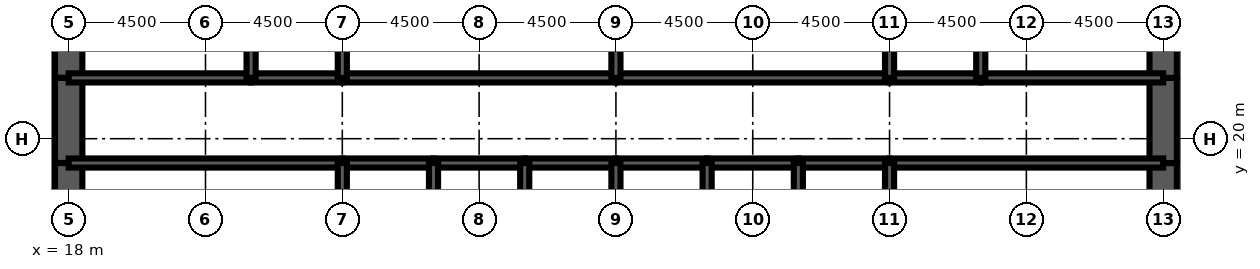
"""IFC4 building model, lengths in metres.
Left out: names, types, materials, properties, quantities, classifications, styles, units other than length and angle.
Written with IfcOpenShell. Run it as: python <this file> out.ifc"""

import sys

from ifc_helpers import new_model, si_unit, direction, frame, frame_2d, origin, place, context, subcontext, project, spatial, rectangle, extrude, element, fill, save


model = new_model("IFC4")
c1 = context("Model", 3, precision=1e-05, world=origin(), true_north=direction((0.0, 1.0)))
c2 = subcontext(c1, "Body", "Model", "MODEL_VIEW")
j1 = project(units=[si_unit("LENGTHUNIT", "METRE"), si_unit("PLANEANGLEUNIT", "RADIAN")], contexts=[c1])
p1 = place(None, origin())
s1 = spatial("IfcSite", under=j1, at=p1, CompositionType="ELEMENT")
p2 = place(p1, origin())
s2 = spatial("IfcBuilding", under=s1, at=p2, CompositionType="ELEMENT")
p3 = place(p2, frame((0.0, 0.0, 81.5)))
s3 = spatial("IfcBuildingStorey", under=s2, at=p3, CompositionType="ELEMENT", Elevation=81.5)
p4 = place(p3, frame((18.0, 26.0, 0.0), z_axis=(0.0, 0.0, 1.0), x_axis=(0.0, -1.0, 0.0)))
e1 = element("IfcWall", 1, at=p4, inside=s3, PredefinedType="SHEAR", context=c2, shape_type="SweptSolid", body=[
    extrude(rectangle(XDim=4.0, YDim=0.9, at=frame_2d((2.0, 0.0))), origin(), (0.0, 0.0, 1.0), 4.5),
])
p5 = place(p3, frame((18.0, 22.0, 0.0), z_axis=(0.0, 0.0, 1.0), x_axis=(0.0, -1.0, 0.0)))
e2 = element("IfcWall", 2, at=p5, inside=s3, PredefinedType="SHEAR", context=c2, shape_type="SweptSolid", body=[
    extrude(rectangle(XDim=2.8, YDim=0.9, at=frame_2d((1.4, 0.0))), origin(), (0.0, 0.0, 1.0), 4.5),
])
p6 = place(p5, frame((0.6, 0.0, 0.0)))
e3 = element("IfcOpeningElement", 3, at=p6, cuts=e2, PredefinedType="OPENING", context=c2, shape_type="SweptSolid", body=[
    extrude(rectangle(XDim=1.8, YDim=2.1, at=frame_2d((0.9, 1.05))), frame((0.0, 0.46, 0.0), z_axis=(0.0, -1.0, 0.0), x_axis=(1.0, 0.0, 0.0)), (0.0, 0.0, 1.0), 0.92),
])
for number, where, z_axis, x_axis in (
    (4, (18.0, 19.2, 0.0), (0.0, 0.0, 1.0), (0.0, -1.0, 0.0)),
    (5, (54.0, 16.0, 0.0), (0.0, 0.0, 1.0), (0.0, 1.0, 0.0)),
):
    element("IfcWall", number, at=place(p3, frame(where, z_axis=z_axis, x_axis=x_axis)), inside=s3, PredefinedType="SHEAR", context=c2, shape_type="SweptSolid", body=[
        extrude(rectangle(XDim=3.2, YDim=0.9, at=frame_2d((1.6, 0.0))), origin(), (0.0, 0.0, 1.0), 4.5),
    ])
p7 = place(p3, frame((54.0, 19.2, 0.0), z_axis=(0.0, 0.0, 1.0), x_axis=(0.0, 1.0, 0.0)))
e6 = element("IfcWall", 6, at=p7, inside=s3, PredefinedType="SHEAR", context=c2, shape_type="SweptSolid", body=[
    extrude(rectangle(XDim=2.8, YDim=0.9, at=frame_2d((1.4, 0.0))), origin(), (0.0, 0.0, 1.0), 4.5),
])
p8 = place(p7, frame((0.4, 0.0, 0.0)))
e7 = element("IfcOpeningElement", 7, at=p8, cuts=e6, PredefinedType="OPENING", context=c2, shape_type="SweptSolid", body=[
    extrude(rectangle(XDim=1.8, YDim=2.1, at=frame_2d((0.9, 1.05))), frame((0.0, 0.46, 0.0), z_axis=(0.0, -1.0, 0.0), x_axis=(1.0, 0.0, 0.0)), (0.0, 0.0, 1.0), 0.92),
])
p9 = place(p3, frame((54.0, 22.0, 0.0), z_axis=(0.0, 0.0, 1.0), x_axis=(0.0, 1.0, 0.0)))
e8 = element("IfcWall", 8, at=p9, inside=s3, PredefinedType="SHEAR", context=c2, shape_type="SweptSolid", body=[
    extrude(rectangle(XDim=4.0, YDim=0.9, at=frame_2d((2.0, 0.0))), origin(), (0.0, 0.0, 1.0), 4.5),
])
p10 = place(p3, frame((18.0, 19.2, 0.0), z_axis=(0.0, 0.0, 1.0), x_axis=(1.0, 0.0, 0.0)))
e9 = element("IfcWall", 9, at=p10, inside=s3, PredefinedType="SOLIDWALL", context=c2, shape_type="SweptSolid", body=[
    extrude(rectangle(XDim=9.0, YDim=0.3, at=frame_2d((4.5, 0.0))), origin(), (0.0, 0.0, 1.0), 4.5),
])
p11 = place(p10, frame((0.65, 0.0, 0.0)))
e10 = element("IfcOpeningElement", 10, at=p11, cuts=e9, PredefinedType="OPENING", context=c2, shape_type="SweptSolid", body=[
    extrude(rectangle(XDim=1.0, YDim=2.1, at=frame_2d((0.5, 1.05))), frame((0.0, 0.16, 0.0), z_axis=(0.0, -1.0, 0.0), x_axis=(1.0, 0.0, 0.0)), (0.0, 0.0, 1.0), 0.32),
])
p12 = place(p3, frame((27.0, 19.2, 0.0), z_axis=(0.0, 0.0, 1.0), x_axis=(1.0, 0.0, 0.0)))
e11 = element("IfcWall", 11, at=p12, inside=s3, PredefinedType="SOLIDWALL", context=c2, shape_type="SweptSolid", body=[
    extrude(rectangle(XDim=3.0, YDim=0.3, at=frame_2d((1.5, 0.0))), origin(), (0.0, 0.0, 1.0), 4.5),
])
p13 = place(p12, frame((0.95, 0.0, 0.0)))
e12 = element("IfcOpeningElement", 12, at=p13, cuts=e11, PredefinedType="OPENING", context=c2, shape_type="SweptSolid", body=[
    extrude(rectangle(XDim=1.1, YDim=2.2, at=frame_2d((0.55, 1.1))), frame((0.0, 0.16, 0.0), z_axis=(0.0, -1.0, 0.0), x_axis=(1.0, 0.0, 0.0)), (0.0, 0.0, 1.0), 0.32),
])
p14 = place(p3, frame((30.0, 19.2, 0.0), z_axis=(0.0, 0.0, 1.0), x_axis=(1.0, 0.0, 0.0)))
e13 = element("IfcWall", 13, at=p14, inside=s3, PredefinedType="SOLIDWALL", context=c2, shape_type="SweptSolid", body=[
    extrude(rectangle(XDim=3.0, YDim=0.3, at=frame_2d((1.5, 0.0))), origin(), (0.0, 0.0, 1.0), 4.5),
])
p15 = place(p14, frame((0.95, 0.0, 0.0)))
e14 = element("IfcOpeningElement", 14, at=p15, cuts=e13, PredefinedType="OPENING", context=c2, shape_type="SweptSolid", body=[
    extrude(rectangle(XDim=1.1, YDim=2.2, at=frame_2d((0.55, 1.1))), frame((0.0, 0.16, 0.0), z_axis=(0.0, -1.0, 0.0), x_axis=(1.0, 0.0, 0.0)), (0.0, 0.0, 1.0), 0.32),
])
p16 = place(p3, frame((33.0, 19.2, 0.0), z_axis=(0.0, 0.0, 1.0), x_axis=(1.0, 0.0, 0.0)))
e15 = element("IfcWall", 15, at=p16, inside=s3, PredefinedType="SOLIDWALL", context=c2, shape_type="SweptSolid", body=[
    extrude(rectangle(XDim=3.0, YDim=0.3, at=frame_2d((1.5, 0.0))), origin(), (0.0, 0.0, 1.0), 4.5),
])
p17 = place(p16, frame((0.95, 0.0, 0.0)))
e16 = element("IfcOpeningElement", 16, at=p17, cuts=e15, PredefinedType="OPENING", context=c2, shape_type="SweptSolid", body=[
    extrude(rectangle(XDim=1.1, YDim=2.2, at=frame_2d((0.55, 1.1))), frame((0.0, 0.16, 0.0), z_axis=(0.0, -1.0, 0.0), x_axis=(1.0, 0.0, 0.0)), (0.0, 0.0, 1.0), 0.32),
])
p18 = place(p3, frame((36.0, 19.2, 0.0), z_axis=(0.0, 0.0, 1.0), x_axis=(1.0, 0.0, 0.0)))
e17 = element("IfcWall", 17, at=p18, inside=s3, PredefinedType="SOLIDWALL", context=c2, shape_type="SweptSolid", body=[
    extrude(rectangle(XDim=3.0, YDim=0.3, at=frame_2d((1.5, 0.0))), origin(), (0.0, 0.0, 1.0), 4.5),
])
p19 = place(p18, frame((0.95, 0.0, 0.0)))
e18 = element("IfcOpeningElement", 18, at=p19, cuts=e17, PredefinedType="OPENING", context=c2, shape_type="SweptSolid", body=[
    extrude(rectangle(XDim=1.1, YDim=2.2, at=frame_2d((0.55, 1.1))), frame((0.0, 0.16, 0.0), z_axis=(0.0, -1.0, 0.0), x_axis=(1.0, 0.0, 0.0)), (0.0, 0.0, 1.0), 0.32),
])
for number, where, z_axis, x_axis in (
    (19, (39.0, 19.2, 0.0), (0.0, 0.0, 1.0), (1.0, 0.0, 0.0)),
    (20, (42.0, 19.2, 0.0), (0.0, 0.0, 1.0), (1.0, 0.0, 0.0)),
):
    element("IfcWall", number, at=place(p3, frame(where, z_axis=z_axis, x_axis=x_axis)), inside=s3, PredefinedType="SOLIDWALL", context=c2, shape_type="SweptSolid", body=[
        extrude(rectangle(XDim=3.0, YDim=0.3, at=frame_2d((1.5, 0.0))), origin(), (0.0, 0.0, 1.0), 4.5),
    ])
p20 = place(p3, frame((45.0, 19.2, 0.0), z_axis=(0.0, 0.0, 1.0), x_axis=(1.0, 0.0, 0.0)))
e21 = element("IfcWall", 21, at=p20, inside=s3, PredefinedType="SOLIDWALL", context=c2, shape_type="SweptSolid", body=[
    extrude(rectangle(XDim=9.0, YDim=0.3, at=frame_2d((4.5, 0.0))), origin(), (0.0, 0.0, 1.0), 4.5),
])
p21 = place(p20, frame((7.35, 0.0, 0.0)))
e22 = element("IfcOpeningElement", 22, at=p21, cuts=e21, PredefinedType="OPENING", context=c2, shape_type="SweptSolid", body=[
    extrude(rectangle(XDim=1.0, YDim=2.1, at=frame_2d((0.5, 1.05))), frame((0.0, 0.16, 0.0), z_axis=(0.0, -1.0, 0.0), x_axis=(1.0, 0.0, 0.0)), (0.0, 0.0, 1.0), 0.32),
])
p22 = place(p3, frame((18.0, 22.0, 0.0), z_axis=(0.0, 0.0, 1.0), x_axis=(1.0, 0.0, 0.0)))
e23 = element("IfcWall", 23, at=p22, inside=s3, PredefinedType="SOLIDWALL", context=c2, shape_type="SweptSolid", body=[
    extrude(rectangle(XDim=6.0, YDim=0.3, at=frame_2d((3.0, 0.0))), origin(), (0.0, 0.0, 1.0), 4.5),
])
p23 = place(p22, frame((4.4, 0.0, 0.0)))
e24 = element("IfcOpeningElement", 24, at=p23, cuts=e23, PredefinedType="OPENING", context=c2, shape_type="SweptSolid", body=[
    extrude(rectangle(XDim=1.0, YDim=2.1, at=frame_2d((0.5, 1.05))), frame((0.0, 0.16, 0.0), z_axis=(0.0, -1.0, 0.0), x_axis=(1.0, 0.0, 0.0)), (0.0, 0.0, 1.0), 0.32),
])
p24 = place(p22, frame((0.7, 0.0, 0.0)))
e25 = element("IfcOpeningElement", 25, at=p24, cuts=e23, PredefinedType="OPENING", context=c2, shape_type="SweptSolid", body=[
    extrude(rectangle(XDim=1.0, YDim=2.1, at=frame_2d((0.5, 1.05))), frame((0.0, 0.16, 0.0), z_axis=(0.0, -1.0, 0.0), x_axis=(1.0, 0.0, 0.0)), (0.0, 0.0, 1.0), 0.32),
])
p25 = place(p3, frame((24.0, 22.0, 0.0), z_axis=(0.0, 0.0, 1.0), x_axis=(1.0, 0.0, 0.0)))
e26 = element("IfcWall", 26, at=p25, inside=s3, PredefinedType="SOLIDWALL", context=c2, shape_type="SweptSolid", body=[
    extrude(rectangle(XDim=3.0, YDim=0.3, at=frame_2d((1.5, 0.0))), origin(), (0.0, 0.0, 1.0), 4.5),
])
p26 = place(p25, frame((1.0, 0.0, 0.0)))
e27 = element("IfcOpeningElement", 27, at=p26, cuts=e26, PredefinedType="OPENING", context=c2, shape_type="SweptSolid", body=[
    extrude(rectangle(XDim=1.0, YDim=2.1, at=frame_2d((0.5, 1.05))), frame((0.0, 0.16, 0.0), z_axis=(0.0, -1.0, 0.0), x_axis=(1.0, 0.0, 0.0)), (0.0, 0.0, 1.0), 0.32),
])
p27 = place(p3, frame((27.0, 22.0, 0.0), z_axis=(0.0, 0.0, 1.0), x_axis=(1.0, 0.0, 0.0)))
e28 = element("IfcWall", 28, at=p27, inside=s3, PredefinedType="SOLIDWALL", context=c2, shape_type="SweptSolid", body=[
    extrude(rectangle(XDim=9.0, YDim=0.3, at=frame_2d((4.5, 0.0))), origin(), (0.0, 0.0, 1.0), 4.5),
])
p28 = place(p27, frame((4.0, 0.0, 0.0)))
e29 = element("IfcOpeningElement", 29, at=p28, cuts=e28, PredefinedType="OPENING", context=c2, shape_type="SweptSolid", body=[
    extrude(rectangle(XDim=1.0, YDim=2.1, at=frame_2d((0.5, 1.05))), frame((0.0, 0.16, 0.0), z_axis=(0.0, -1.0, 0.0), x_axis=(1.0, 0.0, 0.0)), (0.0, 0.0, 1.0), 0.32),
])
p29 = place(p3, frame((36.0, 22.0, 0.0), z_axis=(0.0, 0.0, 1.0), x_axis=(1.0, 0.0, 0.0)))
e30 = element("IfcWall", 30, at=p29, inside=s3, PredefinedType="SOLIDWALL", context=c2, shape_type="SweptSolid", body=[
    extrude(rectangle(XDim=9.0, YDim=0.3, at=frame_2d((4.5, 0.0))), origin(), (0.0, 0.0, 1.0), 4.5),
])
p30 = place(p29, frame((4.0, 0.0, 0.0)))
e31 = element("IfcOpeningElement", 31, at=p30, cuts=e30, PredefinedType="OPENING", context=c2, shape_type="SweptSolid", body=[
    extrude(rectangle(XDim=1.0, YDim=2.1, at=frame_2d((0.5, 1.05))), frame((0.0, 0.16, 0.0), z_axis=(0.0, -1.0, 0.0), x_axis=(1.0, 0.0, 0.0)), (0.0, 0.0, 1.0), 0.32),
])
p31 = place(p3, frame((45.0, 22.0, 0.0), z_axis=(0.0, 0.0, 1.0), x_axis=(1.0, 0.0, 0.0)))
e32 = element("IfcWall", 32, at=p31, inside=s3, PredefinedType="SOLIDWALL", context=c2, shape_type="SweptSolid", body=[
    extrude(rectangle(XDim=3.0, YDim=0.3, at=frame_2d((1.5, 0.0))), origin(), (0.0, 0.0, 1.0), 4.5),
])
p32 = place(p31, frame((1.0, 0.0, 0.0)))
e33 = element("IfcOpeningElement", 33, at=p32, cuts=e32, PredefinedType="OPENING", context=c2, shape_type="SweptSolid", body=[
    extrude(rectangle(XDim=1.0, YDim=2.1, at=frame_2d((0.5, 1.05))), frame((0.0, 0.16, 0.0), z_axis=(0.0, -1.0, 0.0), x_axis=(1.0, 0.0, 0.0)), (0.0, 0.0, 1.0), 0.32),
])
p33 = place(p3, frame((48.0, 22.0, 0.0), z_axis=(0.0, 0.0, 1.0), x_axis=(1.0, 0.0, 0.0)))
e34 = element("IfcWall", 34, at=p33, inside=s3, PredefinedType="SOLIDWALL", context=c2, shape_type="SweptSolid", body=[
    extrude(rectangle(XDim=6.0, YDim=0.3, at=frame_2d((3.0, 0.0))), origin(), (0.0, 0.0, 1.0), 4.5),
])
p34 = place(p33, frame((2.0, 0.0, 0.0)))
e35 = element("IfcOpeningElement", 35, at=p34, cuts=e34, PredefinedType="OPENING", context=c2, shape_type="SweptSolid", body=[
    extrude(rectangle(XDim=1.0, YDim=2.1, at=frame_2d((0.5, 1.05))), frame((0.0, 0.16, 0.0), z_axis=(0.0, -1.0, 0.0), x_axis=(1.0, 0.0, 0.0)), (0.0, 0.0, 1.0), 0.32),
])
p35 = place(p33, frame((4.15, 0.0, 0.0)))
e36 = element("IfcOpeningElement", 36, at=p35, cuts=e34, PredefinedType="OPENING", context=c2, shape_type="SweptSolid", body=[
    extrude(rectangle(XDim=1.0, YDim=2.1, at=frame_2d((0.5, 1.05))), frame((0.0, 0.16, 0.0), z_axis=(0.0, -1.0, 0.0), x_axis=(1.0, 0.0, 0.0)), (0.0, 0.0, 1.0), 0.32),
])
for number, where, z_axis, x_axis in (
    (37, (27.0, 16.0, 0.0), (0.0, 0.0, 1.0), (0.0, 1.0, 0.0)),
    (38, (30.0, 16.0, 0.0), (0.0, 0.0, 1.0), (0.0, 1.0, 0.0)),
    (39, (33.0, 16.0, 0.0), (0.0, 0.0, 1.0), (0.0, 1.0, 0.0)),
    (40, (36.0, 16.0, 0.0), (0.0, 0.0, 1.0), (0.0, 1.0, 0.0)),
    (41, (39.0, 16.0, 0.0), (0.0, 0.0, 1.0), (0.0, 1.0, 0.0)),
    (42, (42.0, 16.0, 0.0), (0.0, 0.0, 1.0), (0.0, 1.0, 0.0)),
    (43, (45.0, 16.0, 0.0), (0.0, 0.0, 1.0), (0.0, 1.0, 0.0)),
):
    element("IfcWall", number, at=place(p3, frame(where, z_axis=z_axis, x_axis=x_axis)), inside=s3, PredefinedType="SOLIDWALL", context=c2, shape_type="SweptSolid", body=[
        extrude(rectangle(XDim=3.2, YDim=0.3, at=frame_2d((1.6, 0.0))), origin(), (0.0, 0.0, 1.0), 4.5),
    ])
for number, where, z_axis, x_axis in (
    (44, (24.0, 22.0, 0.0), (0.0, 0.0, 1.0), (0.0, 1.0, 0.0)),
    (45, (27.0, 22.0, 0.0), (0.0, 0.0, 1.0), (0.0, 1.0, 0.0)),
    (46, (36.0, 22.0, 0.0), (0.0, 0.0, 1.0), (0.0, 1.0, 0.0)),
    (47, (45.0, 22.0, 0.0), (0.0, 0.0, 1.0), (0.0, 1.0, 0.0)),
    (48, (48.0, 22.0, 0.0), (0.0, 0.0, 1.0), (0.0, 1.0, 0.0)),
):
    element("IfcWall", number, at=place(p3, frame(where, z_axis=z_axis, x_axis=x_axis)), inside=s3, PredefinedType="SOLIDWALL", context=c2, shape_type="SweptSolid", body=[
        extrude(rectangle(XDim=4.0, YDim=0.3, at=frame_2d((2.0, 0.0))), origin(), (0.0, 0.0, 1.0), 4.5),
    ])
for number, where, z_axis, x_axis in (
    (49, (20.025, 22.15, 0.0), (0.0, 0.0, 1.0), (0.0, 1.0, 0.0)),
    (50, (51.675, 22.15, 0.0), (0.0, 0.0, 1.0), (0.0, 1.0, 0.0)),
):
    element("IfcWall", number, at=place(p3, frame(where, z_axis=z_axis, x_axis=x_axis)), inside=s3, PredefinedType="PARTITIONING", context=c2, shape_type="SweptSolid", body=[
        extrude(rectangle(XDim=3.7, YDim=0.15, at=frame_2d((1.85, 0.0))), origin(), (0.0, 0.0, 1.0), 3.0),
    ])
p36 = place(p13, origin())
e51 = element("IfcDoor", 51, at=p36, inside=s3, OperationType="DOUBLE_DOOR_SLIDING", PredefinedType="USERDEFINED", context=c2, shape_type="SweptSolid", body=[
    extrude(rectangle(XDim=1.1, YDim=2.2, at=frame_2d((0.55, 1.1))), frame((0.0, 0.025, 0.0), z_axis=(0.0, -1.0, 0.0), x_axis=(1.0, 0.0, 0.0)), (0.0, 0.0, 1.0), 0.05),
])
fill(e12, e51)
p37 = place(p15, origin())
e52 = element("IfcDoor", 52, at=p37, inside=s3, OperationType="DOUBLE_DOOR_SLIDING", PredefinedType="USERDEFINED", context=c2, shape_type="SweptSolid", body=[
    extrude(rectangle(XDim=1.1, YDim=2.2, at=frame_2d((0.55, 1.1))), frame((0.0, 0.025, 0.0), z_axis=(0.0, -1.0, 0.0), x_axis=(1.0, 0.0, 0.0)), (0.0, 0.0, 1.0), 0.05),
])
fill(e14, e52)
p38 = place(p17, origin())
e53 = element("IfcDoor", 53, at=p38, inside=s3, OperationType="DOUBLE_DOOR_SLIDING", PredefinedType="USERDEFINED", context=c2, shape_type="SweptSolid", body=[
    extrude(rectangle(XDim=1.1, YDim=2.2, at=frame_2d((0.55, 1.1))), frame((0.0, 0.025, 0.0), z_axis=(0.0, -1.0, 0.0), x_axis=(1.0, 0.0, 0.0)), (0.0, 0.0, 1.0), 0.05),
])
fill(e16, e53)
p39 = place(p19, origin())
e54 = element("IfcDoor", 54, at=p39, inside=s3, OperationType="DOUBLE_DOOR_SLIDING", PredefinedType="USERDEFINED", context=c2, shape_type="SweptSolid", body=[
    extrude(rectangle(XDim=1.1, YDim=2.2, at=frame_2d((0.55, 1.1))), frame((0.0, 0.025, 0.0), z_axis=(0.0, -1.0, 0.0), x_axis=(1.0, 0.0, 0.0)), (0.0, 0.0, 1.0), 0.05),
])
fill(e18, e54)
p40 = place(p11, origin())
e55 = element("IfcDoor", 55, at=p40, inside=s3, OperationType="SINGLE_SWING_LEFT", PredefinedType="DOOR", context=c2, shape_type="SweptSolid", body=[
    extrude(rectangle(XDim=1.0, YDim=2.1, at=frame_2d((0.5, 1.05))), frame((0.0, 0.025, 0.0), z_axis=(0.0, -1.0, 0.0), x_axis=(1.0, 0.0, 0.0)), (0.0, 0.0, 1.0), 0.05),
])
fill(e10, e55)
p41 = place(p21, origin())
e56 = element("IfcDoor", 56, at=p41, inside=s3, OperationType="SINGLE_SWING_RIGHT", PredefinedType="DOOR", context=c2, shape_type="SweptSolid", body=[
    extrude(rectangle(XDim=1.0, YDim=2.1, at=frame_2d((0.5, 1.05))), frame((0.0, 0.025, 0.0), z_axis=(0.0, -1.0, 0.0), x_axis=(1.0, 0.0, 0.0)), (0.0, 0.0, 1.0), 0.05),
])
fill(e22, e56)
p42 = place(p6, origin())
e57 = element("IfcDoor", 57, at=p42, inside=s3, OperationType="SINGLE_SWING_LEFT", PredefinedType="DOOR", context=c2, shape_type="SweptSolid", body=[
    extrude(rectangle(XDim=1.8, YDim=2.1, at=frame_2d((0.9, 1.05))), frame((0.0, 0.45, 0.0), z_axis=(0.0, -1.0, 0.0), x_axis=(1.0, 0.0, 0.0)), (0.0, 0.0, 1.0), 0.899),
])
fill(e3, e57)
p43 = place(p8, origin())
e58 = element("IfcDoor", 58, at=p43, inside=s3, OperationType="SINGLE_SWING_LEFT", PredefinedType="DOOR", context=c2, shape_type="SweptSolid", body=[
    extrude(rectangle(XDim=1.8, YDim=2.1, at=frame_2d((0.9, 1.05))), frame((0.0, 0.45, 0.0), z_axis=(0.0, -1.0, 0.0), x_axis=(1.0, 0.0, 0.0)), (0.0, 0.0, 1.0), 0.899),
])
fill(e7, e58)
p44 = place(p23, origin())
e59 = element("IfcDoor", 59, at=p44, inside=s3, OperationType="SINGLE_SWING_RIGHT", PredefinedType="DOOR", context=c2, shape_type="SweptSolid", body=[
    extrude(rectangle(XDim=1.0, YDim=2.1, at=frame_2d((0.5, 1.05))), frame((0.0, 0.025, 0.0), z_axis=(0.0, -1.0, 0.0), x_axis=(1.0, 0.0, 0.0)), (0.0, 0.0, 1.0), 0.05),
])
fill(e24, e59)
p45 = place(p26, origin())
e60 = element("IfcDoor", 60, at=p45, inside=s3, OperationType="SINGLE_SWING_LEFT", PredefinedType="DOOR", context=c2, shape_type="SweptSolid", body=[
    extrude(rectangle(XDim=1.0, YDim=2.1, at=frame_2d((0.5, 1.05))), frame((0.0, 0.025, 0.0), z_axis=(0.0, -1.0, 0.0), x_axis=(1.0, 0.0, 0.0)), (0.0, 0.0, 1.0), 0.05),
])
fill(e27, e60)
p46 = place(p28, origin())
e61 = element("IfcDoor", 61, at=p46, inside=s3, OperationType="SINGLE_SWING_LEFT", PredefinedType="DOOR", context=c2, shape_type="SweptSolid", body=[
    extrude(rectangle(XDim=1.0, YDim=2.1, at=frame_2d((0.5, 1.05))), frame((0.0, 0.025, 0.0), z_axis=(0.0, -1.0, 0.0), x_axis=(1.0, 0.0, 0.0)), (0.0, 0.0, 1.0), 0.05),
])
fill(e29, e61)
p47 = place(p30, origin())
e62 = element("IfcDoor", 62, at=p47, inside=s3, OperationType="SINGLE_SWING_LEFT", PredefinedType="DOOR", context=c2, shape_type="SweptSolid", body=[
    extrude(rectangle(XDim=1.0, YDim=2.1, at=frame_2d((0.5, 1.05))), frame((0.0, 0.025, 0.0), z_axis=(0.0, -1.0, 0.0), x_axis=(1.0, 0.0, 0.0)), (0.0, 0.0, 1.0), 0.05),
])
fill(e31, e62)
p48 = place(p32, origin())
e63 = element("IfcDoor", 63, at=p48, inside=s3, OperationType="SINGLE_SWING_LEFT", PredefinedType="DOOR", context=c2, shape_type="SweptSolid", body=[
    extrude(rectangle(XDim=1.0, YDim=2.1, at=frame_2d((0.5, 1.05))), frame((0.0, 0.025, 0.0), z_axis=(0.0, -1.0, 0.0), x_axis=(1.0, 0.0, 0.0)), (0.0, 0.0, 1.0), 0.05),
])
fill(e33, e63)
p49 = place(p34, origin())
e64 = element("IfcDoor", 64, at=p49, inside=s3, OperationType="SINGLE_SWING_LEFT", PredefinedType="DOOR", context=c2, shape_type="SweptSolid", body=[
    extrude(rectangle(XDim=1.0, YDim=2.1, at=frame_2d((0.5, 1.05))), frame((0.0, 0.025, 0.0), z_axis=(0.0, -1.0, 0.0), x_axis=(1.0, 0.0, 0.0)), (0.0, 0.0, 1.0), 0.05),
])
fill(e35, e64)
p50 = place(p24, origin())
e65 = element("IfcDoor", 65, at=p50, inside=s3, OperationType="SINGLE_SWING_LEFT", PredefinedType="DOOR", context=c2, shape_type="SweptSolid", body=[
    extrude(rectangle(XDim=1.0, YDim=2.1, at=frame_2d((0.5, 1.05))), frame((0.0, 0.025, 0.0), z_axis=(0.0, -1.0, 0.0), x_axis=(1.0, 0.0, 0.0)), (0.0, 0.0, 1.0), 0.05),
])
fill(e25, e65)
p51 = place(p35, origin())
e66 = element("IfcDoor", 66, at=p51, inside=s3, OperationType="SINGLE_SWING_RIGHT", PredefinedType="DOOR", context=c2, shape_type="SweptSolid", body=[
    extrude(rectangle(XDim=1.0, YDim=2.1, at=frame_2d((0.5, 1.05))), frame((0.0, 0.025, 0.0), z_axis=(0.0, -1.0, 0.0), x_axis=(1.0, 0.0, 0.0)), (0.0, 0.0, 1.0), 0.05),
])
fill(e36, e66)
save(model, sys.argv[1])
